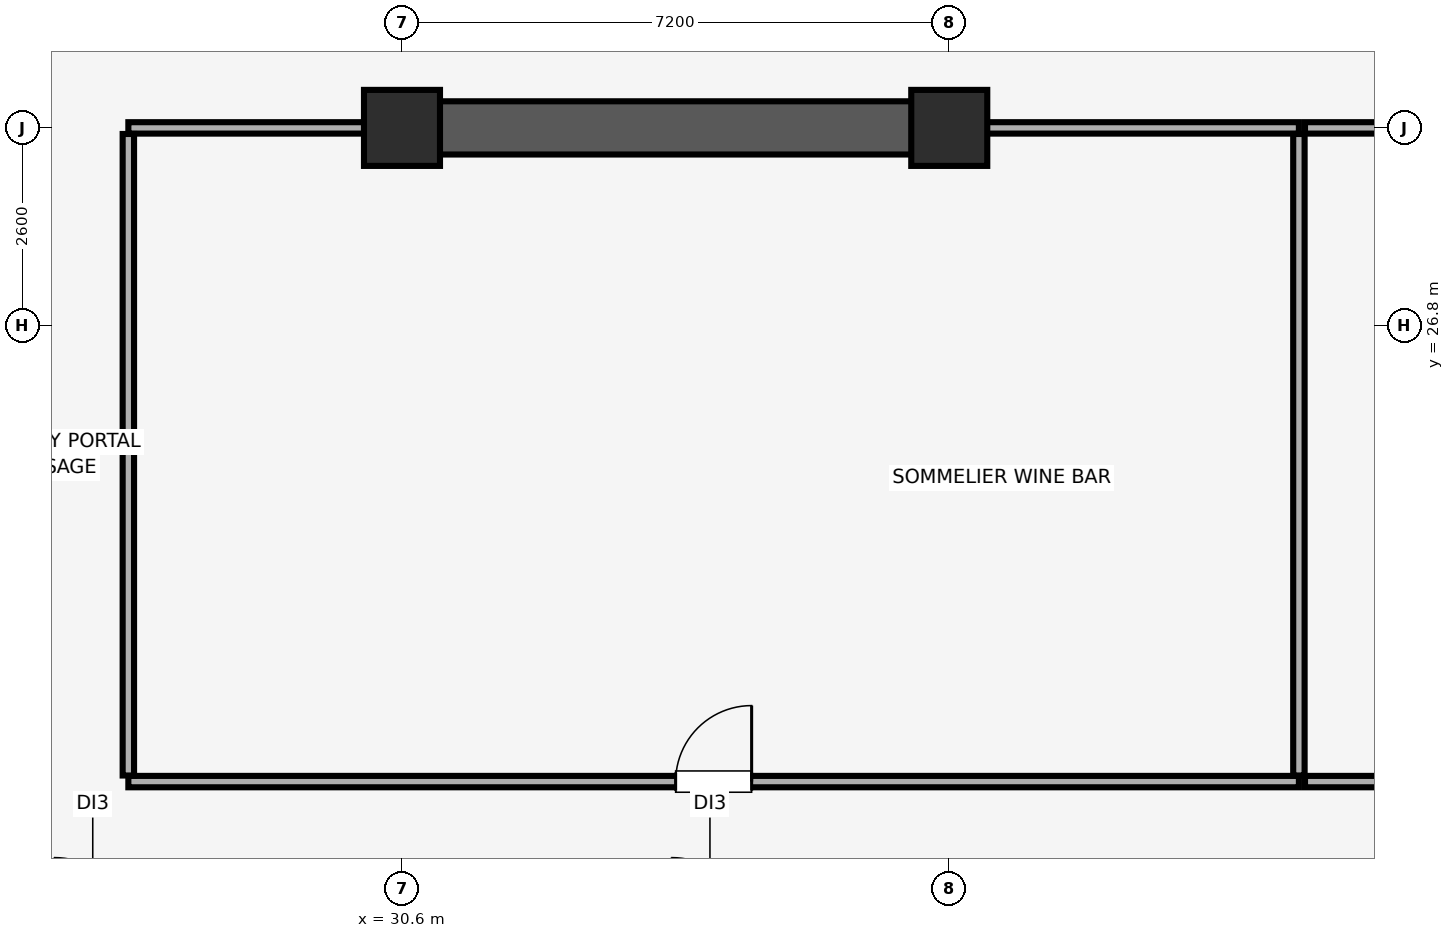
"""IFC4 building model, lengths in metres.
Left out: names, types, materials, properties, quantities, classifications, styles, units other than length and angle.
Written with IfcOpenShell. Run it as: python <this file> out.ifc"""

import sys

from ifc_helpers import new_model, si_unit, direction, frame, frame_2d, origin, origin_2d, place, context, subcontext, project, spatial, rectangle, extrude, element, fill, save


model = new_model("IFC4")
c1 = context("Model", 3, precision=1e-05, world=origin(), true_north=direction((0.0, 1.0)))
c2 = subcontext(c1, "Body", "Model", "MODEL_VIEW")
j1 = project(units=[si_unit("LENGTHUNIT", "METRE"), si_unit("PLANEANGLEUNIT", "RADIAN")], contexts=[c1])
p1 = place(None, origin())
s1 = spatial("IfcSite", under=j1, at=p1, CompositionType="ELEMENT")
p2 = place(p1, origin())
s2 = spatial("IfcBuilding", under=s1, at=p2, CompositionType="ELEMENT")
p3 = place(p2, frame((0.0, 0.0, 285.9)))
s3 = spatial("IfcBuildingStorey", under=s2, at=p3, CompositionType="ELEMENT", Elevation=285.9)
for number, where, z_axis, x_axis in (
    (1, (30.6, 29.4, 0.0), (0.0, 0.0, 1.0), (1.0, 0.0, 0.0)),
    (2, (37.8, 29.4, 0.0), (0.0, 0.0, 1.0), (1.0, 0.0, 0.0)),
):
    element("IfcColumn", number, at=place(p3, frame(where, z_axis=z_axis, x_axis=x_axis)), inside=s3, PredefinedType="COLUMN", context=c2, shape_type="SweptSolid", body=[
        extrude(rectangle(XDim=1.0, YDim=1.0, at=origin_2d()), origin(), (0.0, 0.0, 1.0), 4.1),
    ])
p4 = place(p3, frame((30.4, 29.4, 0.0), z_axis=(0.0, 0.0, 1.0), x_axis=(1.0, 0.0, 0.0)))
e3 = element("IfcWall", 3, at=p4, inside=s3, PredefinedType="SHEAR", context=c2, shape_type="SweptSolid", body=[
    extrude(rectangle(XDim=7.6, YDim=0.7, at=frame_2d((3.8, 0.0))), origin(), (0.0, 0.0, 1.0), 4.1),
])
p5 = place(p3, frame((27.0, 20.8, 0.0), z_axis=(0.0, 0.0, 1.0), x_axis=(1.0, 0.0, 0.0)))
e4 = element("IfcWall", 4, at=p5, inside=s3, PredefinedType="PARTITIONING", context=c2, shape_type="SweptSolid", body=[
    extrude(rectangle(XDim=15.4, YDim=0.15, at=frame_2d((7.7, 0.0))), origin(), (0.0, 0.0, 1.0), 4.1),
])
p6 = place(p5, frame((7.2, 0.0, 0.0)))
e5 = element("IfcOpeningElement", 5, at=p6, cuts=e4, PredefinedType="OPENING", context=c2, shape_type="SweptSolid", body=[
    extrude(rectangle(XDim=1.0, YDim=2.15, at=frame_2d((0.5, 1.075))), frame((0.0, 0.085, 0.0), z_axis=(0.0, -1.0, 0.0), x_axis=(1.0, 0.0, 0.0)), (0.0, 0.0, 1.0), 0.17),
])
p7 = place(p3, frame((27.0, 29.4, 0.0), z_axis=(0.0, 0.0, 1.0), x_axis=(1.0, 0.0, 0.0)))
e6 = element("IfcWall", 6, at=p7, inside=s3, PredefinedType="PARTITIONING", context=c2, shape_type="SweptSolid", body=[
    extrude(rectangle(XDim=3.39, YDim=0.15, at=frame_2d((1.695, 0.0))), origin(), (0.0, 0.0, 1.0), 3.0),
])
p8 = place(p3, frame((38.01, 29.4, 0.0), z_axis=(0.0, 0.0, 1.0), x_axis=(1.0, 0.0, 0.0)))
e7 = element("IfcWall", 7, at=p8, inside=s3, PredefinedType="PARTITIONING", context=c2, shape_type="SweptSolid", body=[
    extrude(rectangle(XDim=4.39, YDim=0.15, at=frame_2d((2.195, 0.0))), origin(), (0.0, 0.0, 1.0), 3.0),
])
p9 = place(p3, frame((27.0, 20.88, 0.0), z_axis=(0.0, 0.0, 1.0), x_axis=(0.0, 1.0, 0.0)))
e8 = element("IfcWall", 8, at=p9, inside=s3, PredefinedType="PARTITIONING", context=c2, shape_type="SweptSolid", body=[
    extrude(rectangle(XDim=8.44, YDim=0.15, at=frame_2d((4.22, 0.0))), origin(), (0.0, 0.0, 1.0), 3.74),
])
p10 = place(p3, frame((42.4, 20.88, 0.0), z_axis=(0.0, 0.0, 1.0), x_axis=(0.0, 1.0, 0.0)))
e9 = element("IfcWall", 9, at=p10, inside=s3, PredefinedType="PARTITIONING", context=c2, shape_type="SweptSolid", body=[
    extrude(rectangle(XDim=8.44, YDim=0.15, at=frame_2d((4.22, 0.0))), origin(), (0.0, 0.0, 1.0), 4.1),
])
p11 = place(p3, frame((42.48, 20.8, 0.0), z_axis=(0.0, 0.0, 1.0), x_axis=(1.0, 0.0, 0.0)))
e10 = element("IfcWall", 10, at=p11, inside=s3, PredefinedType="PARTITIONING", context=c2, shape_type="SweptSolid", body=[
    extrude(rectangle(XDim=14.52, YDim=0.15, at=frame_2d((7.26, 0.0))), origin(), (0.0, 0.0, 1.0), 4.1),
])
p12 = place(p11, frame((6.72, 0.0, 0.0)))
e11 = element("IfcOpeningElement", 11, at=p12, cuts=e10, PredefinedType="OPENING", context=c2, shape_type="SweptSolid", body=[
    extrude(rectangle(XDim=1.0, YDim=2.15, at=frame_2d((0.5, 1.075))), frame((0.0, 0.085, 0.0), z_axis=(0.0, -1.0, 0.0), x_axis=(1.0, 0.0, 0.0)), (0.0, 0.0, 1.0), 0.17),
])
p13 = place(p3, frame((42.48, 29.4, 0.0), z_axis=(0.0, 0.0, 1.0), x_axis=(1.0, 0.0, 0.0)))
e12 = element("IfcWall", 12, at=p13, inside=s3, PredefinedType="PARTITIONING", context=c2, shape_type="SweptSolid", body=[
    extrude(rectangle(XDim=3.51, YDim=0.15, at=frame_2d((1.755, 0.0))), origin(), (0.0, 0.0, 1.0), 3.0),
])
p14 = place(p6, origin())
e13 = element("IfcDoor", 13, at=p14, inside=s3, OperationType="SINGLE_SWING_RIGHT", PredefinedType="DOOR", context=c2, shape_type="SweptSolid", body=[
    extrude(rectangle(XDim=1.0, YDim=2.15, at=frame_2d((0.5, 1.075))), frame((0.0, 0.025, 0.0), z_axis=(0.0, -1.0, 0.0), x_axis=(1.0, 0.0, 0.0)), (0.0, 0.0, 1.0), 0.05),
])
fill(e5, e13)
save(model, sys.argv[1])
